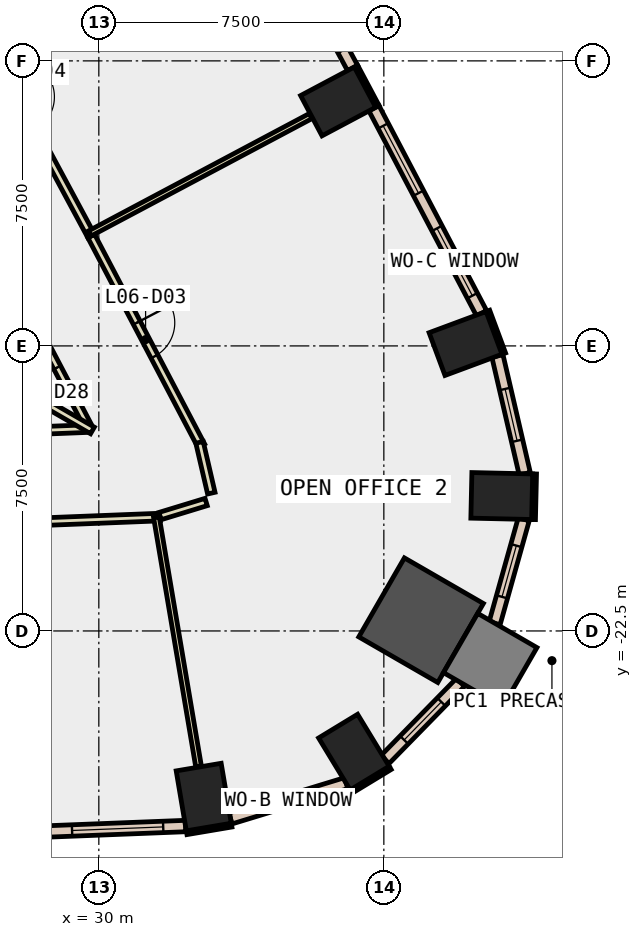
"""IFC4 building model, lengths in metres.
Left out: names, types, materials, properties, quantities, classifications, styles, units other than length and angle.
Written with IfcOpenShell. Run it as: python <this file> out.ifc"""

import sys

from ifc_helpers import new_model, si_unit, direction, frame, frame_2d, origin, origin_2d, place, context, subcontext, project, spatial, rectangle, extrude, element, fill, save


model = new_model("IFC4")
c1 = context("Model", 3, precision=1e-05, world=origin(), true_north=direction((0.0, 1.0)))
c2 = subcontext(c1, "Body", "Model", "MODEL_VIEW")
j1 = project(units=[si_unit("LENGTHUNIT", "METRE"), si_unit("PLANEANGLEUNIT", "RADIAN")], contexts=[c1])
p1 = place(None, origin())
s1 = spatial("IfcSite", under=j1, at=p1, CompositionType="ELEMENT")
p2 = place(p1, origin())
s2 = spatial("IfcBuilding", under=s1, at=p2, CompositionType="ELEMENT")
p3 = place(p2, frame((0.0, 0.0, 35.0)))
s3 = spatial("IfcBuildingStorey", under=s2, at=p3, CompositionType="ELEMENT", Elevation=35.0)
for number, where, z_axis, x_axis in (
    (1, (32.761, -26.871, -0.6), (0.0, 0.0, 1.0), (0.986, 0.167, 0.0)),
    (2, (36.712, -25.688, -0.6), (0.0, 0.0, 1.0), (0.855, 0.519, 0.0)),
):
    element("IfcColumn", number, at=place(p3, frame(where, z_axis=z_axis, x_axis=x_axis)), inside=s3, PredefinedType="COLUMN", context=c2, shape_type="SweptSolid", body=[
        extrude(rectangle(XDim=1.2, YDim=1.6, at=origin_2d()), origin(), (0.0, 0.0, 1.0), 4.4),
    ])
p4 = place(p3, frame((38.48, -22.217, -0.6), z_axis=(0.0, 0.0, 1.0), x_axis=(-0.866025403784, 0.5, 0.0)))
e3 = element("IfcColumn", 3, at=p4, inside=s3, PredefinedType="COLUMN", context=c2, shape_type="SweptSolid", body=[
    extrude(rectangle(XDim=2.4, YDim=2.4, at=origin_2d()), origin(), (0.0, 0.0, 1.0), 4.4),
])
for number, where, z_axis, x_axis in (
    (4, (40.603, -18.95, -0.6), (0.0, 0.0, 1.0), (0.023, 1.0, 0.0)),
    (5, (39.65, -14.936, -0.6), (0.0, 0.0, 1.0), (-0.348, 0.937, 0.0)),
    (6, (36.298, -8.567, -0.6), (0.0, 0.0, 1.0), (-0.469, 0.883, 0.0)),
):
    element("IfcColumn", number, at=place(p3, frame(where, z_axis=z_axis, x_axis=x_axis)), inside=s3, PredefinedType="COLUMN", context=c2, shape_type="SweptSolid", body=[
        extrude(rectangle(XDim=1.2, YDim=1.6, at=origin_2d()), origin(), (0.0, 0.0, 1.0), 4.4),
    ])
p5 = place(p3, frame((40.299, -23.267, -0.6), z_axis=(0.0, 0.0, 1.0), x_axis=(-0.866025403784, 0.5, 0.0)))
e7 = element("IfcColumn", 7, at=p5, inside=s3, PredefinedType="COLUMN", context=c2, shape_type="SweptSolid", body=[
    extrude(rectangle(XDim=1.8, YDim=1.8, at=origin_2d()), origin(), (0.0, 0.0, 1.0), 4.4),
])
p6 = place(p3, frame((40.656, -15.203, 0.0), z_axis=(0.0, 0.0, 1.0), x_axis=(-0.348268249601, 0.937394914814, 0.0)))
e8 = element("IfcWall", 8, at=p6, inside=s3, PredefinedType="STANDARD", context=c2, shape_type="SweptSolid", body=[
    extrude(rectangle(XDim=1.2, YDim=0.1, at=frame_2d((0.6, 0.0))), origin(), (0.0, 0.0, 1.0), 3.8),
])
p7 = place(p3, frame((37.33, -8.698, 0.0), z_axis=(0.0, 0.0, 1.0), x_axis=(-0.469383408131, 0.882994459876, 0.0)))
e9 = element("IfcWall", 9, at=p7, inside=s3, PredefinedType="STANDARD", context=c2, shape_type="SweptSolid", body=[
    extrude(rectangle(XDim=1.199, YDim=0.1, at=frame_2d((0.6, 0.0))), origin(), (0.0, 0.0, 1.0), 3.8),
])
p8 = place(p3, frame((32.311, -27.809, 0.0), z_axis=(0.0, 0.0, 1.0), x_axis=(0.98597830993, 0.166873522011, 0.0)))
e10 = element("IfcWall", 10, at=p8, inside=s3, PredefinedType="STANDARD", context=c2, shape_type="SweptSolid", body=[
    extrude(rectangle(XDim=1.2, YDim=0.1, at=frame_2d((0.6, 0.0))), origin(), (0.0, 0.0, 1.0), 3.8),
])
for number, where, z_axis, x_axis in (
    (11, (36.64, -26.726, 0.0), (0.0, 0.0, 1.0), (0.855, 0.519, 0.0)),
    (12, (41.439, -19.569, 0.0), (0.0, 0.0, 1.0), (0.023, 1.0, 0.0)),
):
    element("IfcWall", number, at=place(p3, frame(where, z_axis=z_axis, x_axis=x_axis)), inside=s3, PredefinedType="STANDARD", context=c2, shape_type="SweptSolid", body=[
        extrude(rectangle(XDim=1.2, YDim=0.1, at=frame_2d((0.6, 0.0))), origin(), (0.0, 0.0, 1.0), 3.8),
    ])
p9 = place(p3, frame((25.134, -27.914, 0.0), z_axis=(0.0, 0.0, 1.0), x_axis=(0.999228146648, 0.039282450878, 0.0)))
e13 = element("IfcWall", 13, at=p9, inside=s3, PredefinedType="STANDARD", context=c2, shape_type="SweptSolid", body=[
    extrude(rectangle(XDim=7.154, YDim=0.3, at=frame_2d((3.577, 0.0))), origin(), (0.0, 0.0, 1.0), 3.8),
])
p10 = place(p9, frame((0.588, 0.0, 0.9)))
e14 = element("IfcOpeningElement", 14, at=p10, cuts=e13, PredefinedType="OPENING", context=c2, shape_type="SweptSolid", body=[
    extrude(rectangle(XDim=2.4, YDim=2.6, at=frame_2d((1.2, 1.3))), frame((0.0, 0.16, 0.0), z_axis=(0.0, -1.0, 0.0), x_axis=(1.0, 0.0, 0.0)), (0.0, 0.0, 1.0), 0.32),
])
p11 = place(p9, frame((4.165, 0.0, 0.9)))
e15 = element("IfcOpeningElement", 15, at=p11, cuts=e13, PredefinedType="OPENING", context=c2, shape_type="SweptSolid", body=[
    extrude(rectangle(XDim=2.4, YDim=2.6, at=frame_2d((1.2, 1.3))), frame((0.0, 0.16, 0.0), z_axis=(0.0, -1.0, 0.0), x_axis=(1.0, 0.0, 0.0)), (0.0, 0.0, 1.0), 0.32),
])
p12 = place(p3, frame((33.464, -27.433, 0.0), z_axis=(0.0, 0.0, 1.0), x_axis=(0.95648967224, 0.291766185322, 0.0)))
e16 = element("IfcWall", 16, at=p12, inside=s3, PredefinedType="STANDARD", context=c2, shape_type="SweptSolid", body=[
    extrude(rectangle(XDim=3.181, YDim=0.3, at=frame_2d((1.591, 0.0))), origin(), (0.0, 0.0, 1.0), 3.8),
])
p13 = place(p12, frame((0.891, 0.0, 0.9)))
e17 = element("IfcOpeningElement", 17, at=p13, cuts=e16, PredefinedType="OPENING", context=c2, shape_type="SweptSolid", body=[
    extrude(rectangle(XDim=1.4, YDim=2.6, at=frame_2d((0.7, 1.3))), frame((0.0, 0.16, 0.0), z_axis=(0.0, -1.0, 0.0), x_axis=(1.0, 0.0, 0.0)), (0.0, 0.0, 1.0), 0.32),
])
p14 = place(p3, frame((37.531, -25.883, 0.0), z_axis=(0.0, 0.0, 1.0), x_axis=(0.699151821451, 0.714973237654, 0.0)))
e18 = element("IfcWall", 18, at=p14, inside=s3, PredefinedType="STANDARD", context=c2, shape_type="SweptSolid", body=[
    extrude(rectangle(XDim=2.839, YDim=0.3, at=frame_2d((1.42, 0.0))), origin(), (0.0, 0.0, 1.0), 3.8),
])
p15 = place(p14, frame((0.72, 0.0, 0.9)))
e19 = element("IfcOpeningElement", 19, at=p15, cuts=e18, PredefinedType="OPENING", context=c2, shape_type="SweptSolid", body=[
    extrude(rectangle(XDim=1.4, YDim=2.6, at=frame_2d((0.7, 1.3))), frame((0.0, 0.16, 0.0), z_axis=(0.0, -1.0, 0.0), x_axis=(1.0, 0.0, 0.0)), (0.0, 0.0, 1.0), 0.32),
])
p16 = place(p3, frame((40.415, -22.296, 0.0), z_axis=(0.0, 0.0, 1.0), x_axis=(0.269754317033, 0.962929181426, 0.0)))
e20 = element("IfcWall", 20, at=p16, inside=s3, PredefinedType="STANDARD", context=c2, shape_type="SweptSolid", body=[
    extrude(rectangle(XDim=2.839, YDim=0.3, at=frame_2d((1.419, 0.0))), origin(), (0.0, 0.0, 1.0), 3.8),
])
p17 = place(p16, frame((0.72, 0.0, 0.9)))
e21 = element("IfcOpeningElement", 21, at=p17, cuts=e20, PredefinedType="OPENING", context=c2, shape_type="SweptSolid", body=[
    extrude(rectangle(XDim=1.4, YDim=2.6, at=frame_2d((0.7, 1.3))), frame((0.0, 0.16, 0.0), z_axis=(0.0, -1.0, 0.0), x_axis=(1.0, 0.0, 0.0)), (0.0, 0.0, 1.0), 0.32),
])
p18 = place(p3, frame((41.208, -18.364, 0.0), z_axis=(0.0, 0.0, 1.0), x_axis=(-0.225929520451, 0.974143650489, 0.0)))
e22 = element("IfcWall", 22, at=p18, inside=s3, PredefinedType="STANDARD", context=c2, shape_type="SweptSolid", body=[
    extrude(rectangle(XDim=3.182, YDim=0.3, at=frame_2d((1.591, 0.0))), origin(), (0.0, 0.0, 1.0), 3.8),
])
p19 = place(p18, frame((0.891, 0.0, 0.9)))
e23 = element("IfcOpeningElement", 23, at=p19, cuts=e22, PredefinedType="OPENING", context=c2, shape_type="SweptSolid", body=[
    extrude(rectangle(XDim=1.4, YDim=2.6, at=frame_2d((0.7, 1.3))), frame((0.0, 0.16, 0.0), z_axis=(0.0, -1.0, 0.0), x_axis=(1.0, 0.0, 0.0)), (0.0, 0.0, 1.0), 0.32),
])
p20 = place(p3, frame((40.072, -14.141, 0.0), z_axis=(0.0, 0.0, 1.0), x_axis=(-0.464913987781, 0.885355851602, 0.0)))
e24 = element("IfcWall", 24, at=p20, inside=s3, PredefinedType="STANDARD", context=c2, shape_type="SweptSolid", body=[
    extrude(rectangle(XDim=6.094, YDim=0.3, at=frame_2d((3.047, 0.0))), origin(), (0.0, 0.0, 1.0), 3.8),
])
p21 = place(p20, frame((0.523, 0.0, 0.9)))
e25 = element("IfcOpeningElement", 25, at=p21, cuts=e24, PredefinedType="OPENING", context=c2, shape_type="SweptSolid", body=[
    extrude(rectangle(XDim=2.0, YDim=2.6, at=frame_2d((1.0, 1.3))), frame((0.0, 0.16, 0.0), z_axis=(0.0, -1.0, 0.0), x_axis=(1.0, 0.0, 0.0)), (0.0, 0.0, 1.0), 0.32),
])
p22 = place(p20, frame((3.57, 0.0, 0.9)))
e26 = element("IfcOpeningElement", 26, at=p22, cuts=e24, PredefinedType="OPENING", context=c2, shape_type="SweptSolid", body=[
    extrude(rectangle(XDim=2.0, YDim=2.6, at=frame_2d((1.0, 1.3))), frame((0.0, 0.16, 0.0), z_axis=(0.0, -1.0, 0.0), x_axis=(1.0, 0.0, 0.0)), (0.0, 0.0, 1.0), 0.32),
])
p23 = place(p3, frame((36.677, -7.688, 0.0), z_axis=(0.0, 0.0, 1.0), x_axis=(-0.47375467653, 0.880656860795, 0.0)))
e27 = element("IfcWall", 27, at=p23, inside=s3, PredefinedType="STANDARD", context=c2, shape_type="SweptSolid", body=[
    extrude(rectangle(XDim=6.117, YDim=0.3, at=frame_2d((3.059, 0.0))), origin(), (0.0, 0.0, 1.0), 3.8),
])
p24 = place(p23, frame((0.529, 0.0, 0.9)))
e28 = element("IfcOpeningElement", 28, at=p24, cuts=e27, PredefinedType="OPENING", context=c2, shape_type="SweptSolid", body=[
    extrude(rectangle(XDim=2.0, YDim=2.6, at=frame_2d((1.0, 1.3))), frame((0.0, 0.16, 0.0), z_axis=(0.0, -1.0, 0.0), x_axis=(1.0, 0.0, 0.0)), (0.0, 0.0, 1.0), 0.32),
])
p25 = place(p23, frame((3.588, 0.0, 0.9)))
e29 = element("IfcOpeningElement", 29, at=p25, cuts=e27, PredefinedType="OPENING", context=c2, shape_type="SweptSolid", body=[
    extrude(rectangle(XDim=2.0, YDim=2.6, at=frame_2d((1.0, 1.3))), frame((0.0, 0.16, 0.0), z_axis=(0.0, -1.0, 0.0), x_axis=(1.0, 0.0, 0.0)), (0.0, 0.0, 1.0), 0.32),
])
p26 = place(p3, frame((24.18, -17.393, 0.0), z_axis=(0.0, 0.0, 1.0), x_axis=(0.999226657848, 0.039320303228, 0.0)))
e30 = element("IfcWall", 30, at=p26, inside=s3, PredefinedType="PARTITIONING", context=c2, shape_type="SweptSolid", body=[
    extrude(rectangle(XDim=5.57, YDim=0.2, at=frame_2d((2.785, 0.0))), origin(), (0.0, 0.0, 1.0), 3.8),
])
p27 = place(p26, frame((2.284, 0.0, 0.0)))
e31 = element("IfcOpeningElement", 31, at=p27, cuts=e30, PredefinedType="OPENING", context=c2, shape_type="SweptSolid", body=[
    extrude(rectangle(XDim=1.0, YDim=2.1, at=frame_2d((0.5, 1.05))), frame((0.0, 0.11, 0.0), z_axis=(0.0, -1.0, 0.0), x_axis=(1.0, 0.0, 0.0)), (0.0, 0.0, 1.0), 0.22),
])
p28 = place(p3, frame((29.702, -17.085, 0.0), z_axis=(0.0, 0.0, 1.0), x_axis=(-0.464998228159, 0.88531161057, 0.0)))
e32 = element("IfcWall", 32, at=p28, inside=s3, PredefinedType="PARTITIONING", context=c2, shape_type="SweptSolid", body=[
    extrude(rectangle(XDim=4.426, YDim=0.2, at=frame_2d((2.213, 0.0))), origin(), (0.0, 0.0, 1.0), 3.8),
])
p29 = place(p28, frame((1.713, 0.0, 0.0)))
e33 = element("IfcOpeningElement", 33, at=p29, cuts=e32, PredefinedType="OPENING", context=c2, shape_type="SweptSolid", body=[
    extrude(rectangle(XDim=1.0, YDim=2.1, at=frame_2d((0.5, 1.05))), frame((0.0, 0.11, 0.0), z_axis=(0.0, -1.0, 0.0), x_axis=(1.0, 0.0, 0.0)), (0.0, 0.0, 1.0), 0.22),
])
p30 = place(p3, frame((31.615, -19.503, 0.0), z_axis=(0.0, 0.0, 1.0), x_axis=(-0.999228381006, -0.039276489048, 0.0)))
e34 = element("IfcWall", 34, at=p30, inside=s3, PredefinedType="PARTITIONING", context=c2, shape_type="SweptSolid", body=[
    extrude(rectangle(XDim=7.36, YDim=0.2, at=frame_2d((3.68, 0.0))), origin(), (0.0, 0.0, 1.0), 3.8),
])
p31 = place(p3, frame((29.799, -12.107, 0.0), z_axis=(0.0, 0.0, 1.0), x_axis=(0.464767882002, -0.885432558617, 0.0)))
e35 = element("IfcWall", 35, at=p31, inside=s3, PredefinedType="PARTITIONING", context=c2, shape_type="SweptSolid", body=[
    extrude(rectangle(XDim=6.233, YDim=0.2, at=frame_2d((3.117, 0.0))), origin(), (0.0, 0.0, 1.0), 3.8),
])
p32 = place(p31, frame((2.58, 0.0, 0.0)))
e36 = element("IfcOpeningElement", 36, at=p32, cuts=e35, PredefinedType="OPENING", context=c2, shape_type="SweptSolid", body=[
    extrude(rectangle(XDim=1.0, YDim=2.1, at=frame_2d((0.5, 1.05))), frame((0.0, 0.11, 0.0), z_axis=(0.0, -1.0, 0.0), x_axis=(1.0, 0.0, 0.0)), (0.0, 0.0, 1.0), 0.22),
])
p33 = place(p3, frame((32.65, -17.538, 0.0), z_axis=(0.0, 0.0, 1.0), x_axis=(0.226081445763, -0.974108402531, 0.0)))
e37 = element("IfcWall", 37, at=p33, inside=s3, PredefinedType="PARTITIONING", context=c2, shape_type="SweptSolid", body=[
    extrude(rectangle(XDim=1.371, YDim=0.2, at=frame_2d((0.686, 0.0))), origin(), (0.0, 0.0, 1.0), 3.8),
])
p34 = place(p3, frame((32.824, -19.107, 0.0), z_axis=(0.0, 0.0, 1.0), x_axis=(-0.956459113118, -0.291866347723, 0.0)))
e38 = element("IfcWall", 38, at=p34, inside=s3, PredefinedType="PARTITIONING", context=c2, shape_type="SweptSolid", body=[
    extrude(rectangle(XDim=1.268, YDim=0.2, at=frame_2d((0.634, 0.0))), origin(), (0.0, 0.0, 1.0), 3.8),
])
p35 = place(p3, frame((26.337, -5.671, 0.0), z_axis=(0.0, 0.0, 1.0), x_axis=(0.473794961698, -0.880635187958, 0.0)))
e39 = element("IfcWall", 39, at=p35, inside=s3, PredefinedType="PARTITIONING", context=c2, shape_type="SweptSolid", body=[
    extrude(rectangle(XDim=7.307, YDim=0.2, at=frame_2d((3.654, 0.0))), origin(), (0.0, 0.0, 1.0), 3.8),
])
p36 = place(p35, frame((3.154, 0.0, 0.0)))
e40 = element("IfcOpeningElement", 40, at=p36, cuts=e39, PredefinedType="OPENING", context=c2, shape_type="SweptSolid", body=[
    extrude(rectangle(XDim=1.0, YDim=2.1, at=frame_2d((0.5, 1.05))), frame((0.0, 0.11, 0.0), z_axis=(0.0, -1.0, 0.0), x_axis=(1.0, 0.0, 0.0)), (0.0, 0.0, 1.0), 0.22),
])
p37 = place(p3, frame((24.811, -14.326, 0.0), z_axis=(0.0, 0.0, 1.0), x_axis=(0.866076195524, -0.499912015806, 0.0)))
e41 = element("IfcWall", 41, at=p37, inside=s3, PredefinedType="PARTITIONING", context=c2, shape_type="SweptSolid", body=[
    extrude(rectangle(XDim=5.797, YDim=0.2, at=frame_2d((2.899, 0.0))), origin(), (0.0, 0.0, 1.0), 3.8),
])
p38 = place(p3, frame((31.515, -19.506, 0.0), z_axis=(0.0, 0.0, 1.0), x_axis=(0.166785823947, -0.985993148521, 0.0)))
e42 = element("IfcWall", 42, at=p38, inside=s3, PredefinedType="PARTITIONING", context=c2, shape_type="SweptSolid", body=[
    extrude(rectangle(XDim=6.65, YDim=0.15, at=frame_2d((3.325, 0.0))), origin(), (0.0, 0.0, 1.0), 3.8),
])
p39 = place(p3, frame((29.764, -12.04, 0.0), z_axis=(0.0, 0.0, 1.0), x_axis=(0.883018657393, 0.469337885426, 0.0)))
e43 = element("IfcWall", 43, at=p39, inside=s3, PredefinedType="PARTITIONING", context=c2, shape_type="SweptSolid", body=[
    extrude(rectangle(XDim=6.58, YDim=0.15, at=frame_2d((3.29, 0.0))), origin(), (0.0, 0.0, 1.0), 3.8),
])
p40 = place(p11, origin())
e44 = element("IfcWindow", 44, at=p40, inside=s3, PartitioningType="SINGLE_PANEL", PredefinedType="WINDOW", context=c2, shape_type="SweptSolid", body=[
    extrude(rectangle(XDim=2.4, YDim=2.6, at=frame_2d((1.2, 1.3))), frame((0.0, 0.03, 0.0), z_axis=(0.0, -1.0, 0.0), x_axis=(1.0, 0.0, 0.0)), (0.0, 0.0, 1.0), 0.06),
])
fill(e15, e44)
p41 = place(p13, origin())
e45 = element("IfcWindow", 45, at=p41, inside=s3, PartitioningType="SINGLE_PANEL", PredefinedType="WINDOW", context=c2, shape_type="SweptSolid", body=[
    extrude(rectangle(XDim=1.4, YDim=2.6, at=frame_2d((0.7, 1.3))), frame((0.0, 0.03, 0.0), z_axis=(0.0, -1.0, 0.0), x_axis=(1.0, 0.0, 0.0)), (0.0, 0.0, 1.0), 0.06),
])
fill(e17, e45)
p42 = place(p15, origin())
e46 = element("IfcWindow", 46, at=p42, inside=s3, PartitioningType="SINGLE_PANEL", PredefinedType="WINDOW", context=c2, shape_type="SweptSolid", body=[
    extrude(rectangle(XDim=1.4, YDim=2.6, at=frame_2d((0.7, 1.3))), frame((0.0, 0.03, 0.0), z_axis=(0.0, -1.0, 0.0), x_axis=(1.0, 0.0, 0.0)), (0.0, 0.0, 1.0), 0.06),
])
fill(e19, e46)
p43 = place(p17, origin())
e47 = element("IfcWindow", 47, at=p43, inside=s3, PartitioningType="SINGLE_PANEL", PredefinedType="WINDOW", context=c2, shape_type="SweptSolid", body=[
    extrude(rectangle(XDim=1.4, YDim=2.6, at=frame_2d((0.7, 1.3))), frame((0.0, 0.03, 0.0), z_axis=(0.0, -1.0, 0.0), x_axis=(1.0, 0.0, 0.0)), (0.0, 0.0, 1.0), 0.06),
])
fill(e21, e47)
p44 = place(p19, origin())
e48 = element("IfcWindow", 48, at=p44, inside=s3, PartitioningType="SINGLE_PANEL", PredefinedType="WINDOW", context=c2, shape_type="SweptSolid", body=[
    extrude(rectangle(XDim=1.4, YDim=2.6, at=frame_2d((0.7, 1.3))), frame((0.0, 0.03, 0.0), z_axis=(0.0, -1.0, 0.0), x_axis=(1.0, 0.0, 0.0)), (0.0, 0.0, 1.0), 0.06),
])
fill(e23, e48)
p45 = place(p21, origin())
e49 = element("IfcWindow", 49, at=p45, inside=s3, PartitioningType="SINGLE_PANEL", PredefinedType="WINDOW", context=c2, shape_type="SweptSolid", body=[
    extrude(rectangle(XDim=2.0, YDim=2.6, at=frame_2d((1.0, 1.3))), frame((0.0, 0.03, 0.0), z_axis=(0.0, -1.0, 0.0), x_axis=(1.0, 0.0, 0.0)), (0.0, 0.0, 1.0), 0.06),
])
fill(e25, e49)
p46 = place(p22, origin())
e50 = element("IfcWindow", 50, at=p46, inside=s3, PartitioningType="SINGLE_PANEL", PredefinedType="WINDOW", context=c2, shape_type="SweptSolid", body=[
    extrude(rectangle(XDim=2.0, YDim=2.6, at=frame_2d((1.0, 1.3))), frame((0.0, 0.03, 0.0), z_axis=(0.0, -1.0, 0.0), x_axis=(1.0, 0.0, 0.0)), (0.0, 0.0, 1.0), 0.06),
])
fill(e26, e50)
p47 = place(p32, origin())
e51 = element("IfcDoor", 51, at=p47, inside=s3, OperationType="SINGLE_SWING_LEFT", PredefinedType="DOOR", context=c2, shape_type="SweptSolid", body=[
    extrude(rectangle(XDim=1.0, YDim=2.1, at=frame_2d((0.5, 1.05))), frame((0.0, 0.025, 0.0), z_axis=(0.0, -1.0, 0.0), x_axis=(1.0, 0.0, 0.0)), (0.0, 0.0, 1.0), 0.05),
])
fill(e36, e51)
p48 = place(p29, origin())
e52 = element("IfcDoor", 52, at=p48, inside=s3, OperationType="SINGLE_SWING_LEFT", PredefinedType="DOOR", context=c2, shape_type="SweptSolid", body=[
    extrude(rectangle(XDim=1.0, YDim=2.1, at=frame_2d((0.5, 1.05))), frame((0.0, 0.025, 0.0), z_axis=(0.0, -1.0, 0.0), x_axis=(1.0, 0.0, 0.0)), (0.0, 0.0, 1.0), 0.05),
])
fill(e33, e52)
save(model, sys.argv[1])
